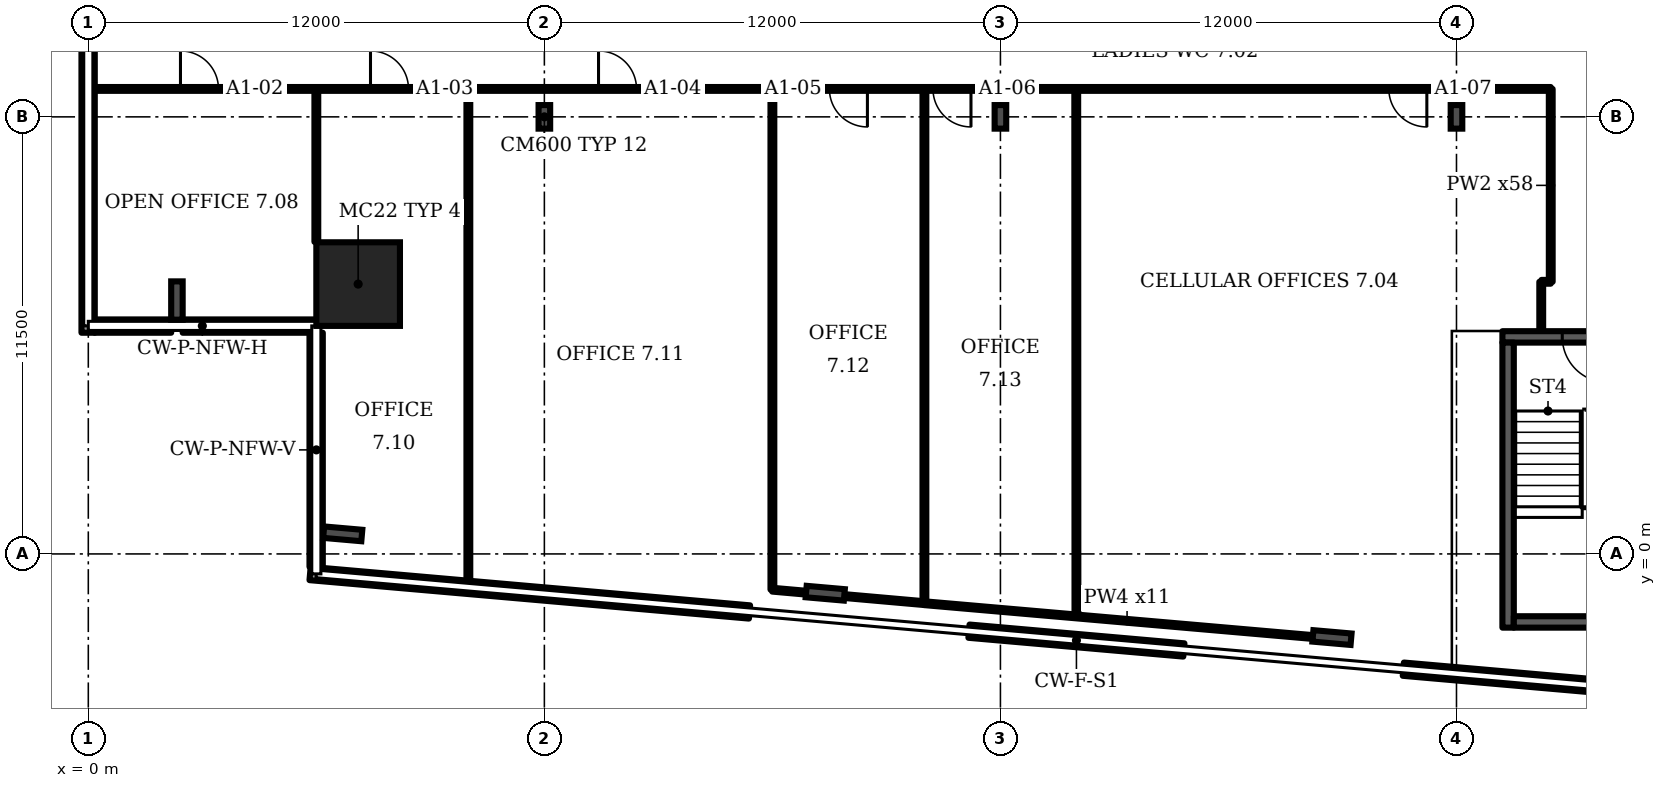
"""IFC4 building model, lengths in metres.
Left out: names, types, materials, properties, quantities, classifications, styles, units other than length and angle.
Written with IfcOpenShell. Run it as: python <this file> out.ifc"""

import sys

from ifc_helpers import new_model, si_unit, direction, frame, frame_2d, origin, origin_2d, place, context, subcontext, project, spatial, rectangle, i_section, extrude, element, fill, save


model = new_model("IFC4")
c1 = context("Model", 3, precision=1e-05, world=origin(), true_north=direction((0.0, 1.0)))
c2 = subcontext(c1, "Body", "Model", "MODEL_VIEW")
j1 = project(units=[si_unit("LENGTHUNIT", "METRE"), si_unit("PLANEANGLEUNIT", "RADIAN")], contexts=[c1])
p1 = place(None, origin())
s1 = spatial("IfcSite", under=j1, at=p1, CompositionType="ELEMENT")
p2 = place(p1, origin())
s2 = spatial("IfcBuilding", under=s1, at=p2, CompositionType="ELEMENT")
p3 = place(p2, frame((0.0, 0.0, 45.1)))
s3 = spatial("IfcBuildingStorey", under=s2, at=p3, CompositionType="ELEMENT", Elevation=45.1)
p4 = place(p3, frame((7.1, 7.1, 0.0), z_axis=(0.0, 0.0, 1.0), x_axis=(1.0, 0.0, 0.0)))
e1 = element("IfcColumn", 1, at=p4, inside=s3, PredefinedType="COLUMN", context=c2, shape_type="SweptSolid", body=[
    extrude(rectangle(XDim=2.2, YDim=2.2, at=origin_2d()), origin(), (0.0, 0.0, 1.0), 3.6),
])
for number, where, z_axis, x_axis in (
    (2, (6.694, 0.529, 0.0), (0.0, 0.0, 1.0), (-0.087, -0.996, 0.0)),
    (3, (19.391, -1.034, 0.0), (0.0, 0.0, 1.0), (-0.087, -0.996, 0.0)),
    (4, (32.724, -2.2, 0.0), (0.0, 0.0, 1.0), (-0.087, -0.996, 0.0)),
    (5, (2.332, 6.667, 0.0), (0.0, 0.0, 1.0), (-1.0, 0.0, 0.0)),
):
    element("IfcColumn", number, at=place(p3, frame(where, z_axis=z_axis, x_axis=x_axis)), inside=s3, PredefinedType="COLUMN", context=c2, shape_type="SweptSolid", body=[
        extrude(i_section(OverallWidth=0.302, OverallDepth=1.008, WebThickness=0.021, FlangeThickness=0.04, FilletRadius=0.03, at=origin_2d()), origin(), (0.0, 0.0, 1.0), 3.6),
    ])
for number, where, z_axis, x_axis in (
    (6, (12.0, 11.5, 0.0), (0.0, 0.0, 1.0), (1.0, 0.0, 0.0)),
    (7, (24.0, 11.5, 0.0), (0.0, 0.0, 1.0), (1.0, 0.0, 0.0)),
    (8, (36.0, 11.5, 0.0), (0.0, 0.0, 1.0), (1.0, 0.0, 0.0)),
):
    element("IfcColumn", number, at=place(p3, frame(where, z_axis=z_axis, x_axis=x_axis)), inside=s3, PredefinedType="COLUMN", context=c2, shape_type="SweptSolid", body=[
        extrude(i_section(OverallWidth=0.305, OverallDepth=0.62, WebThickness=0.021, FlangeThickness=0.04, FilletRadius=0.027, at=origin_2d()), origin(), (0.0, 0.0, 1.0), 3.6),
    ])
p5 = place(p3, frame((5.835, -0.516, 0.0), z_axis=(0.0, 0.0, 1.0), x_axis=(0.996192, -0.087142, 0.0)))
e9 = element("IfcWall", 9, at=p5, inside=s3, PredefinedType="SOLIDWALL", context=c2, shape_type="SweptSolid", body=[
    extrude(rectangle(XDim=11.607, YDim=0.35, at=frame_2d((5.804, 0.0))), origin(), (0.0, 0.0, 1.0), 1.0),
])
p6 = place(p3, frame((23.172, -2.032, 0.0), z_axis=(0.0, 0.0, 1.0), x_axis=(0.996196, -0.087185, 0.0)))
e10 = element("IfcWall", 10, at=p6, inside=s3, PredefinedType="SOLIDWALL", context=c2, shape_type="SweptSolid", body=[
    extrude(rectangle(XDim=5.676, YDim=0.35, at=frame_2d((2.838, 0.0))), origin(), (0.0, 0.0, 1.0), 1.0),
])
p7 = place(p3, frame((34.601, -3.032, 0.0), z_axis=(0.0, 0.0, 1.0), x_axis=(0.996193, -0.087148, 0.0)))
e11 = element("IfcWall", 11, at=p7, inside=s3, PredefinedType="SOLIDWALL", context=c2, shape_type="SweptSolid", body=[
    extrude(rectangle(XDim=11.458, YDim=0.35, at=frame_2d((5.729, 0.0))), origin(), (0.0, 0.0, 1.0), 1.0),
])
p8 = place(p3, frame((-0.005, 17.97, 0.0), z_axis=(0.0, 0.0, 1.0), x_axis=(0.0, -1.0, 0.0)))
e12 = element("IfcWall", 12, at=p8, inside=s3, PredefinedType="SOLIDWALL", context=c2, shape_type="SweptSolid", body=[
    extrude(rectangle(XDim=12.15, YDim=0.35, at=frame_2d((6.075, 0.0))), origin(), (0.0, 0.0, 1.0), 1.0),
])
p9 = place(p3, frame((0.17, 5.995, 0.0), z_axis=(0.0, 0.0, 1.0), x_axis=(1.0, 0.0, 0.0)))
e13 = element("IfcWall", 13, at=p9, inside=s3, PredefinedType="SOLIDWALL", context=c2, shape_type="SweptSolid", body=[
    extrude(rectangle(XDim=2.011, YDim=0.35, at=frame_2d((1.005, 0.0))), origin(), (0.0, 0.0, 1.0), 1.0),
])
p10 = place(p3, frame((2.483, 5.995, 0.0), z_axis=(0.0, 0.0, 1.0), x_axis=(1.0, 0.0, 0.0)))
e14 = element("IfcWall", 14, at=p10, inside=s3, PredefinedType="SOLIDWALL", context=c2, shape_type="SweptSolid", body=[
    extrude(rectangle(XDim=3.517, YDim=0.35, at=frame_2d((1.759, 0.0))), origin(), (0.0, 0.0, 1.0), 1.0),
])
p11 = place(p3, frame((5.995, 5.82, 0.0), z_axis=(0.0, 0.0, 1.0), x_axis=(0.0, -1.0, 0.0)))
e15 = element("IfcWall", 15, at=p11, inside=s3, PredefinedType="SOLIDWALL", context=c2, shape_type="SweptSolid", body=[
    extrude(rectangle(XDim=6.161, YDim=0.35, at=frame_2d((3.081, 0.0))), origin(), (0.0, 0.0, 1.0), 1.0),
])
p12 = place(p3, frame((37.208, 5.711, 0.0), z_axis=(0.0, 0.0, 1.0), x_axis=(1.0, 0.0, 0.0)))
e16 = element("IfcWall", 16, at=p12, inside=s3, PredefinedType="SHEAR", context=c2, shape_type="SweptSolid", body=[
    extrude(rectangle(XDim=4.35, YDim=0.3, at=frame_2d((2.175, 0.0))), origin(), (0.0, 0.0, 1.0), 3.2),
])
p13 = place(p12, frame((1.575, 0.0, 0.0)))
e17 = element("IfcOpeningElement", 17, at=p13, cuts=e16, PredefinedType="OPENING", context=c2, shape_type="SweptSolid", body=[
    extrude(rectangle(XDim=1.2, YDim=2.1, at=frame_2d((0.6, 1.05))), frame((0.0, 0.16, 0.0), z_axis=(0.0, -1.0, 0.0), x_axis=(1.0, 0.0, 0.0)), (0.0, 0.0, 1.0), 0.32),
])
p14 = place(p3, frame((0.02, 12.235, 0.0), z_axis=(0.0, 0.0, 1.0), x_axis=(1.0, 0.0, 0.0)))
e18 = element("IfcWall", 18, at=p14, inside=s3, PredefinedType="PARTITIONING", context=c2, shape_type="SweptSolid", body=[
    extrude(rectangle(XDim=38.46, YDim=0.1, at=frame_2d((19.23, 0.0))), origin(), (0.0, 0.0, 1.0), 3.2),
])
p15 = place(p14, frame((2.405, 0.0, 0.0)))
e19 = element("IfcOpeningElement", 19, at=p15, cuts=e18, PredefinedType="OPENING", context=c2, shape_type="SweptSolid", body=[
    extrude(rectangle(XDim=1.0, YDim=2.1, at=frame_2d((0.5, 1.05))), frame((0.0, 0.06, 0.0), z_axis=(0.0, -1.0, 0.0), x_axis=(1.0, 0.0, 0.0)), (0.0, 0.0, 1.0), 0.12),
])
p16 = place(p14, frame((7.405, 0.0, 0.0)))
e20 = element("IfcOpeningElement", 20, at=p16, cuts=e18, PredefinedType="OPENING", context=c2, shape_type="SweptSolid", body=[
    extrude(rectangle(XDim=1.0, YDim=2.1, at=frame_2d((0.5, 1.05))), frame((0.0, 0.06, 0.0), z_axis=(0.0, -1.0, 0.0), x_axis=(1.0, 0.0, 0.0)), (0.0, 0.0, 1.0), 0.12),
])
p17 = place(p14, frame((13.405, 0.0, 0.0)))
e21 = element("IfcOpeningElement", 21, at=p17, cuts=e18, PredefinedType="OPENING", context=c2, shape_type="SweptSolid", body=[
    extrude(rectangle(XDim=1.0, YDim=2.1, at=frame_2d((0.5, 1.05))), frame((0.0, 0.06, 0.0), z_axis=(0.0, -1.0, 0.0), x_axis=(1.0, 0.0, 0.0)), (0.0, 0.0, 1.0), 0.12),
])
p18 = place(p14, frame((19.48, 0.0, 0.0)))
e22 = element("IfcOpeningElement", 22, at=p18, cuts=e18, PredefinedType="OPENING", context=c2, shape_type="SweptSolid", body=[
    extrude(rectangle(XDim=1.0, YDim=2.1, at=frame_2d((0.5, 1.05))), frame((0.0, 0.06, 0.0), z_axis=(0.0, -1.0, 0.0), x_axis=(1.0, 0.0, 0.0)), (0.0, 0.0, 1.0), 0.12),
])
p19 = place(p14, frame((22.205, 0.0, 0.0)))
e23 = element("IfcOpeningElement", 23, at=p19, cuts=e18, PredefinedType="OPENING", context=c2, shape_type="SweptSolid", body=[
    extrude(rectangle(XDim=1.0, YDim=2.1, at=frame_2d((0.5, 1.05))), frame((0.0, 0.06, 0.0), z_axis=(0.0, -1.0, 0.0), x_axis=(1.0, 0.0, 0.0)), (0.0, 0.0, 1.0), 0.12),
])
p20 = place(p14, frame((34.2, 0.0, 0.0)))
e24 = element("IfcOpeningElement", 24, at=p20, cuts=e18, PredefinedType="OPENING", context=c2, shape_type="SweptSolid", body=[
    extrude(rectangle(XDim=1.0, YDim=2.1, at=frame_2d((0.5, 1.05))), frame((0.0, 0.06, 0.0), z_axis=(0.0, -1.0, 0.0), x_axis=(1.0, 0.0, 0.0)), (0.0, 0.0, 1.0), 0.12),
])
p21 = place(p3, frame((6.0, 8.21, 0.0), z_axis=(0.0, 0.0, 1.0), x_axis=(0.0, 1.0, 0.0)))
e25 = element("IfcWall", 25, at=p21, inside=s3, PredefinedType="PARTITIONING", context=c2, shape_type="SweptSolid", body=[
    extrude(rectangle(XDim=4.025, YDim=0.1, at=frame_2d((2.013, 0.0))), origin(), (0.0, 0.0, 1.0), 3.2),
])
p22 = place(p3, frame((10.0, -0.855, 0.0), z_axis=(0.0, 0.0, 1.0), x_axis=(0.0, 1.0, 0.0)))
e26 = element("IfcWall", 26, at=p22, inside=s3, PredefinedType="PARTITIONING", context=c2, shape_type="SweptSolid", body=[
    extrude(rectangle(XDim=13.09, YDim=0.1, at=frame_2d((6.545, 0.0))), origin(), (0.0, 0.0, 1.0), 3.2),
])
p23 = place(p3, frame((18.0, -0.94, 0.0), z_axis=(0.0, 0.0, 1.0), x_axis=(0.0, 1.0, 0.0)))
e27 = element("IfcWall", 27, at=p23, inside=s3, PredefinedType="PARTITIONING", context=c2, shape_type="SweptSolid", body=[
    extrude(rectangle(XDim=13.175, YDim=0.1, at=frame_2d((6.587, 0.0))), origin(), (0.0, 0.0, 1.0), 3.2),
])
p24 = place(p3, frame((22.0, -1.295, 0.0), z_axis=(0.0, 0.0, 1.0), x_axis=(-0.99611, 0.088069, 0.0)))
e28 = element("IfcWall", 28, at=p24, inside=s3, PredefinedType="PARTITIONING", context=c2, shape_type="SweptSolid", body=[
    extrude(rectangle(XDim=4.017, YDim=0.1, at=frame_2d((2.008, 0.0))), origin(), (0.0, 0.0, 1.0), 2.58),
])
p25 = place(p3, frame((22.0, -1.295, 0.0), z_axis=(0.0, 0.0, 1.0), x_axis=(0.0, 1.0, 0.0)))
e29 = element("IfcWall", 29, at=p25, inside=s3, PredefinedType="PARTITIONING", context=c2, shape_type="SweptSolid", body=[
    extrude(rectangle(XDim=13.53, YDim=0.1, at=frame_2d((6.765, 0.0))), origin(), (0.0, 0.0, 1.0), 3.2),
])
p26 = place(p3, frame((26.0, -1.645, 0.0), z_axis=(0.0, 0.0, 1.0), x_axis=(-0.000352, 1.000004, 0.0)))
e30 = element("IfcWall", 30, at=p26, inside=s3, PredefinedType="PARTITIONING", context=c2, shape_type="SweptSolid", body=[
    extrude(rectangle(XDim=13.88, YDim=0.1, at=frame_2d((6.94, 0.0))), origin(), (0.0, 0.0, 1.0), 3.2),
])
p27 = place(p3, frame((32.665, -2.225, 0.0), z_axis=(0.0, 0.0, 1.0), x_axis=(-0.99623, 0.086702, 0.0)))
e31 = element("IfcWall", 31, at=p27, inside=s3, PredefinedType="PARTITIONING", context=c2, shape_type="SweptSolid", body=[
    extrude(rectangle(XDim=10.706, YDim=0.1, at=frame_2d((5.353, 0.0))), origin(), (0.0, 0.0, 1.0), 2.58),
])
p28 = place(p3, frame((38.23, 5.881, 0.0), z_axis=(0.0, 0.0, 1.0), x_axis=(0.0, 1.0, 0.0)))
e32 = element("IfcWall", 32, at=p28, inside=s3, PredefinedType="PARTITIONING", context=c2, shape_type="SweptSolid", body=[
    extrude(rectangle(XDim=1.279, YDim=0.1, at=frame_2d((0.64, 0.0))), origin(), (0.0, 0.0, 1.0), 3.2),
])
p29 = place(p3, frame((38.235, 7.16, 0.0), z_axis=(0.0, 0.0, 1.0), x_axis=(1.0, 0.0, 0.0)))
e33 = element("IfcWall", 33, at=p29, inside=s3, PredefinedType="PARTITIONING", context=c2, shape_type="SweptSolid", body=[
    extrude(rectangle(XDim=0.245, YDim=0.1, at=frame_2d((0.123, 0.0))), origin(), (0.0, 0.0, 1.0), 3.2),
])
p30 = place(p3, frame((38.48, 7.16, 0.0), z_axis=(0.0, 0.0, 1.0), x_axis=(0.0, 1.0, 0.0)))
e34 = element("IfcWall", 34, at=p30, inside=s3, PredefinedType="PARTITIONING", context=c2, shape_type="SweptSolid", body=[
    extrude(rectangle(XDim=5.075, YDim=0.1, at=frame_2d((2.538, 0.0))), origin(), (0.0, 0.0, 1.0), 3.2),
])
p31 = place(p3, frame((37.358, -1.939, 0.0), z_axis=(0.0, 0.0, 1.0), x_axis=(0.0, 1.0, 0.0)))
e35 = element("IfcWall", 35, at=p31, inside=s3, PredefinedType="SHEAR", context=c2, shape_type="SweptSolid", body=[
    extrude(rectangle(XDim=7.5, YDim=0.3, at=frame_2d((3.75, 0.0))), origin(), (0.0, 0.0, 1.0), 3.2),
])
p32 = place(p3, frame((37.508, -1.789, 0.0), z_axis=(0.0, 0.0, 1.0), x_axis=(1.0, 0.0, 0.0)))
e36 = element("IfcWall", 36, at=p32, inside=s3, PredefinedType="SHEAR", context=c2, shape_type="SweptSolid", body=[
    extrude(rectangle(XDim=3.75, YDim=0.3, at=frame_2d((1.875, 0.0))), origin(), (0.0, 0.0, 1.0), 3.2),
])
p33 = place(p13, origin())
e37 = element("IfcDoor", 37, at=p33, inside=s3, OperationType="SINGLE_SWING_RIGHT", PredefinedType="DOOR", context=c2, shape_type="SweptSolid", body=[
    extrude(rectangle(XDim=1.2, YDim=2.1, at=frame_2d((0.6, 1.05))), frame((0.0, 0.025, 0.0), z_axis=(0.0, -1.0, 0.0), x_axis=(1.0, 0.0, 0.0)), (0.0, 0.0, 1.0), 0.05),
])
fill(e17, e37)
p34 = place(p15, origin())
e38 = element("IfcDoor", 38, at=p34, inside=s3, OperationType="SINGLE_SWING_LEFT", PredefinedType="DOOR", context=c2, shape_type="SweptSolid", body=[
    extrude(rectangle(XDim=1.0, YDim=2.1, at=frame_2d((0.5, 1.05))), frame((0.0, 0.025, 0.0), z_axis=(0.0, -1.0, 0.0), x_axis=(1.0, 0.0, 0.0)), (0.0, 0.0, 1.0), 0.05),
])
fill(e19, e38)
p35 = place(p16, origin())
e39 = element("IfcDoor", 39, at=p35, inside=s3, OperationType="SINGLE_SWING_LEFT", PredefinedType="DOOR", context=c2, shape_type="SweptSolid", body=[
    extrude(rectangle(XDim=1.0, YDim=2.1, at=frame_2d((0.5, 1.05))), frame((0.0, 0.025, 0.0), z_axis=(0.0, -1.0, 0.0), x_axis=(1.0, 0.0, 0.0)), (0.0, 0.0, 1.0), 0.05),
])
fill(e20, e39)
p36 = place(p17, origin())
e40 = element("IfcDoor", 40, at=p36, inside=s3, OperationType="SINGLE_SWING_LEFT", PredefinedType="DOOR", context=c2, shape_type="SweptSolid", body=[
    extrude(rectangle(XDim=1.0, YDim=2.1, at=frame_2d((0.5, 1.05))), frame((0.0, 0.025, 0.0), z_axis=(0.0, -1.0, 0.0), x_axis=(1.0, 0.0, 0.0)), (0.0, 0.0, 1.0), 0.05),
])
fill(e21, e40)
p37 = place(p18, origin())
e41 = element("IfcDoor", 41, at=p37, inside=s3, OperationType="SINGLE_SWING_RIGHT", PredefinedType="DOOR", context=c2, shape_type="SweptSolid", body=[
    extrude(rectangle(XDim=1.0, YDim=2.1, at=frame_2d((0.5, 1.05))), frame((0.0, 0.025, 0.0), z_axis=(0.0, -1.0, 0.0), x_axis=(1.0, 0.0, 0.0)), (0.0, 0.0, 1.0), 0.05),
])
fill(e22, e41)
p38 = place(p19, origin())
e42 = element("IfcDoor", 42, at=p38, inside=s3, OperationType="SINGLE_SWING_RIGHT", PredefinedType="DOOR", context=c2, shape_type="SweptSolid", body=[
    extrude(rectangle(XDim=1.0, YDim=2.1, at=frame_2d((0.5, 1.05))), frame((0.0, 0.025, 0.0), z_axis=(0.0, -1.0, 0.0), x_axis=(1.0, 0.0, 0.0)), (0.0, 0.0, 1.0), 0.05),
])
fill(e23, e42)
p39 = place(p20, origin())
e43 = element("IfcDoor", 43, at=p39, inside=s3, OperationType="SINGLE_SWING_RIGHT", PredefinedType="DOOR", context=c2, shape_type="SweptSolid", body=[
    extrude(rectangle(XDim=1.0, YDim=2.1, at=frame_2d((0.5, 1.05))), frame((0.0, 0.025, 0.0), z_axis=(0.0, -1.0, 0.0), x_axis=(1.0, 0.0, 0.0)), (0.0, 0.0, 1.0), 0.05),
])
fill(e24, e43)
save(model, sys.argv[1])
